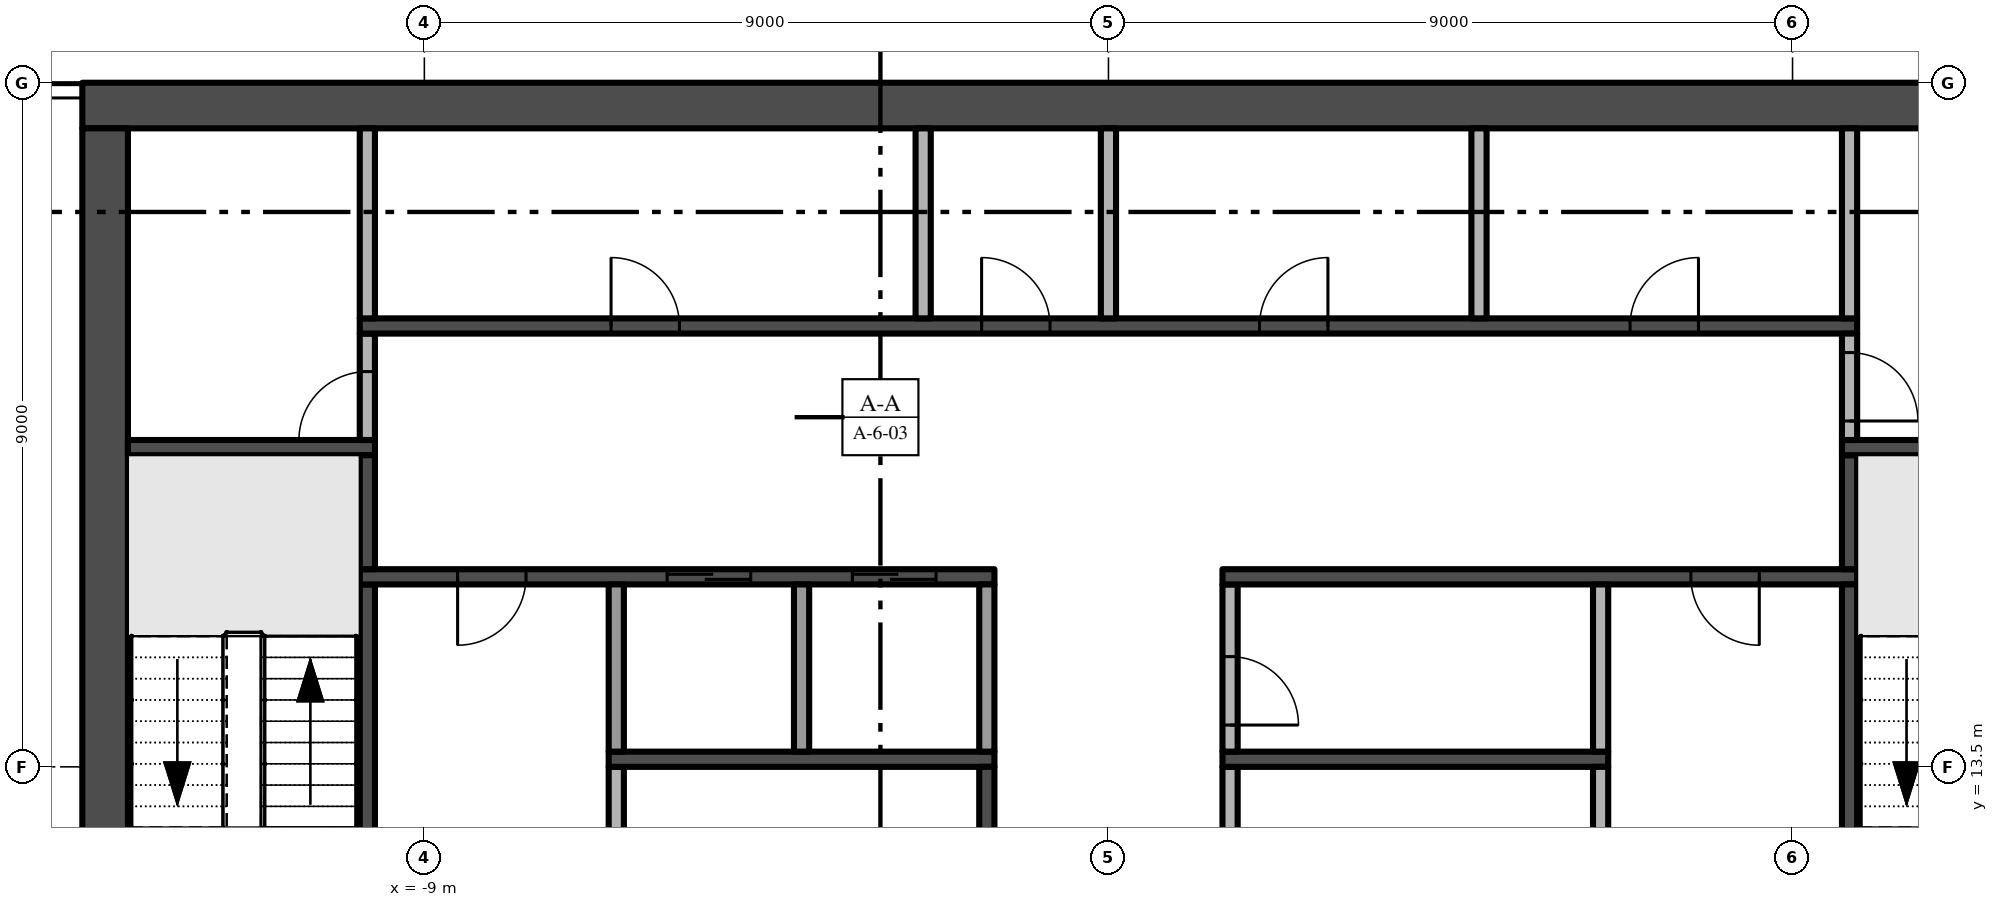
"""IFC4 building model, lengths in metres.
Left out: names, types, materials, properties, quantities, classifications, styles, units other than length and angle.
Written with IfcOpenShell. Run it as: python <this file> out.ifc"""

import sys

from ifc_helpers import new_model, si_unit, direction, frame, frame_2d, origin, place, context, subcontext, project, spatial, rectangle, extrude, element, fill, save


model = new_model("IFC4")
c1 = context("Model", 3, precision=1e-05, world=origin(), true_north=direction((0.0, 1.0)))
c2 = subcontext(c1, "Body", "Model", "MODEL_VIEW")
j1 = project(units=[si_unit("LENGTHUNIT", "METRE"), si_unit("PLANEANGLEUNIT", "RADIAN")], contexts=[c1])
p1 = place(None, origin())
s1 = spatial("IfcSite", under=j1, at=p1, CompositionType="ELEMENT")
p2 = place(p1, origin())
s2 = spatial("IfcBuilding", under=s1, at=p2, CompositionType="ELEMENT")
p3 = place(p2, frame((0.0, 0.0, 297.4)))
s3 = spatial("IfcBuildingStorey", under=s2, at=p3, CompositionType="ELEMENT", Elevation=297.4)
p4 = place(p3, frame((13.5, 22.2, -0.3), z_axis=(0.0, 0.0, 1.0), x_axis=(-1.0, 0.0, 0.0)))
e1 = element("IfcWall", 1, at=p4, inside=s3, PredefinedType="SHEAR", context=c2, shape_type="SweptSolid", body=[
    extrude(rectangle(XDim=27.0, YDim=0.6, at=frame_2d((13.5, 0.0))), origin(), (0.0, 0.0, 1.0), 5.95),
])
p5 = place(p3, frame((-13.2, 21.9, -0.3), z_axis=(0.0, 0.0, 1.0), x_axis=(0.0, -1.0, 0.0)))
e2 = element("IfcWall", 2, at=p5, inside=s3, PredefinedType="SHEAR", context=c2, shape_type="SweptSolid", body=[
    extrude(rectangle(XDim=16.8, YDim=0.6, at=frame_2d((8.4, 0.0))), origin(), (0.0, 0.0, 1.0), 5.95),
])
p6 = place(p5, frame((9.3, 0.0, 0.3)))
e3 = element("IfcOpeningElement", 3, at=p6, cuts=e2, PredefinedType="OPENING", context=c2, shape_type="SweptSolid", body=[
    extrude(rectangle(XDim=1.2, YDim=2.2, at=frame_2d((0.6, 1.1))), frame((0.0, 0.31, 0.0), z_axis=(0.0, -1.0, 0.0), x_axis=(1.0, 0.0, 0.0)), (0.0, 0.0, 1.0), 0.62),
])
p7 = place(p3, frame((-12.9, 17.7, 0.0), z_axis=(0.0, 0.0, 1.0), x_axis=(1.0, 0.0, 0.0)))
e4 = element("IfcWall", 4, at=p7, inside=s3, PredefinedType="SHEAR", context=c2, shape_type="SweptSolid", body=[
    extrude(rectangle(XDim=3.25, YDim=0.2, at=frame_2d((1.625, 0.0))), origin(), (0.0, 0.0, 1.0), 5.65),
])
p8 = place(p3, frame((-9.75, 10.2, 0.0), z_axis=(0.0, 0.0, 1.0), x_axis=(0.0, 1.0, 0.0)))
e5 = element("IfcWall", 5, at=p8, inside=s3, PredefinedType="SHEAR", context=c2, shape_type="SweptSolid", body=[
    extrude(rectangle(XDim=5.7, YDim=0.2, at=frame_2d((2.85, 0.0))), origin(), (0.0, 0.0, 1.0), 5.65),
])
p9 = place(p3, frame((-1.5, 16.0, 0.0), z_axis=(0.0, 0.0, 1.0), x_axis=(-1.0, 0.0, 0.0)))
e6 = element("IfcWall", 6, at=p9, inside=s3, PredefinedType="SHEAR", context=c2, shape_type="SweptSolid", body=[
    extrude(rectangle(XDim=8.35, YDim=0.2, at=frame_2d((4.175, 0.0))), origin(), (0.0, 0.0, 1.0), 5.65),
])
p10 = place(p9, frame((3.206, 0.0, 0.0)))
e7 = element("IfcOpeningElement", 7, at=p10, cuts=e6, PredefinedType="OPENING", context=c2, shape_type="SweptSolid", body=[
    extrude(rectangle(XDim=1.1, YDim=2.1, at=frame_2d((0.55, 1.05))), frame((0.0, 0.11, 0.0), z_axis=(0.0, -1.0, 0.0), x_axis=(1.0, 0.0, 0.0)), (0.0, 0.0, 1.0), 0.22),
])
p11 = place(p9, frame((0.769, 0.0, 0.0)))
e8 = element("IfcOpeningElement", 8, at=p11, cuts=e6, PredefinedType="OPENING", context=c2, shape_type="SweptSolid", body=[
    extrude(rectangle(XDim=1.1, YDim=2.1, at=frame_2d((0.55, 1.05))), frame((0.0, 0.11, 0.0), z_axis=(0.0, -1.0, 0.0), x_axis=(1.0, 0.0, 0.0)), (0.0, 0.0, 1.0), 0.22),
])
p12 = place(p9, frame((6.162, 0.0, 0.0)))
e9 = element("IfcOpeningElement", 9, at=p12, cuts=e6, PredefinedType="OPENING", context=c2, shape_type="SweptSolid", body=[
    extrude(rectangle(XDim=0.9, YDim=2.1, at=frame_2d((0.45, 1.05))), frame((0.0, 0.11, 0.0), z_axis=(0.0, -1.0, 0.0), x_axis=(1.0, 0.0, 0.0)), (0.0, 0.0, 1.0), 0.22),
])
p13 = place(p3, frame((-9.75, 16.1, 0.0), z_axis=(0.0, 0.0, 1.0), x_axis=(0.0, 1.0, 0.0)))
e10 = element("IfcWall", 10, at=p13, inside=s3, PredefinedType="SHEAR", context=c2, shape_type="SweptSolid", body=[
    extrude(rectangle(XDim=1.5, YDim=0.2, at=frame_2d((0.75, 0.0))), origin(), (0.0, 0.0, 1.0), 5.65),
])
p14 = place(p3, frame((-9.75, 17.8, 0.0), z_axis=(0.0, 0.0, 1.0), x_axis=(0.0, 1.0, 0.0)))
e11 = element("IfcWall", 11, at=p14, inside=s3, PredefinedType="PARTITIONING", context=c2, shape_type="SweptSolid", body=[
    extrude(rectangle(XDim=1.4, YDim=0.2, at=frame_2d((0.7, 0.0))), origin(), (0.0, 0.0, 1.0), 5.65),
])
p15 = place(p14, origin())
e12 = element("IfcOpeningElement", 12, at=p15, cuts=e11, PredefinedType="OPENING", context=c2, shape_type="SweptSolid", body=[
    extrude(rectangle(XDim=0.9, YDim=2.1, at=frame_2d((0.45, 1.05))), frame((0.0, 0.11, 0.0), z_axis=(0.0, -1.0, 0.0), x_axis=(1.0, 0.0, 0.0)), (0.0, 0.0, 1.0), 0.22),
])
p16 = place(p3, frame((-9.85, 19.3, 0.0), z_axis=(0.0, 0.0, 1.0), x_axis=(1.0, 0.0, 0.0)))
e13 = element("IfcWall", 13, at=p16, inside=s3, PredefinedType="SHEAR", context=c2, shape_type="SweptSolid", body=[
    extrude(rectangle(XDim=19.7, YDim=0.2, at=frame_2d((9.85, 0.0))), origin(), (0.0, 0.0, 1.0), 5.65),
])
p17 = place(p16, frame((11.838, 0.0, 0.0)))
e14 = element("IfcOpeningElement", 14, at=p17, cuts=e13, PredefinedType="OPENING", context=c2, shape_type="SweptSolid", body=[
    extrude(rectangle(XDim=0.9, YDim=2.1, at=frame_2d((0.45, 1.05))), frame((0.0, 0.11, 0.0), z_axis=(0.0, -1.0, 0.0), x_axis=(1.0, 0.0, 0.0)), (0.0, 0.0, 1.0), 0.22),
])
p18 = place(p16, frame((16.712, 0.0, 0.0)))
e15 = element("IfcOpeningElement", 15, at=p18, cuts=e13, PredefinedType="OPENING", context=c2, shape_type="SweptSolid", body=[
    extrude(rectangle(XDim=0.9, YDim=2.1, at=frame_2d((0.45, 1.05))), frame((0.0, 0.11, 0.0), z_axis=(0.0, -1.0, 0.0), x_axis=(1.0, 0.0, 0.0)), (0.0, 0.0, 1.0), 0.22),
])
p19 = place(p16, frame((3.306, 0.0, 0.0)))
e16 = element("IfcOpeningElement", 16, at=p19, cuts=e13, PredefinedType="OPENING", context=c2, shape_type="SweptSolid", body=[
    extrude(rectangle(XDim=0.9, YDim=2.1, at=frame_2d((0.45, 1.05))), frame((0.0, 0.11, 0.0), z_axis=(0.0, -1.0, 0.0), x_axis=(1.0, 0.0, 0.0)), (0.0, 0.0, 1.0), 0.22),
])
p20 = place(p16, frame((8.181, 0.0, 0.0)))
e17 = element("IfcOpeningElement", 17, at=p20, cuts=e13, PredefinedType="OPENING", context=c2, shape_type="SweptSolid", body=[
    extrude(rectangle(XDim=0.9, YDim=2.1, at=frame_2d((0.45, 1.05))), frame((0.0, 0.11, 0.0), z_axis=(0.0, -1.0, 0.0), x_axis=(1.0, 0.0, 0.0)), (0.0, 0.0, 1.0), 0.22),
])
p21 = place(p3, frame((-9.75, 19.4, 0.0), z_axis=(0.0, 0.0, 1.0), x_axis=(0.0, 1.0, 0.0)))
e18 = element("IfcWall", 18, at=p21, inside=s3, PredefinedType="PARTITIONING", context=c2, shape_type="SweptSolid", body=[
    extrude(rectangle(XDim=2.5, YDim=0.2, at=frame_2d((1.25, 0.0))), origin(), (0.0, 0.0, 1.0), 5.65),
])
p22 = place(p3, frame((-6.475, 8.15, 0.0), z_axis=(0.0, 0.0, 1.0), x_axis=(0.0, 1.0, 0.0)))
e19 = element("IfcWall", 19, at=p22, inside=s3, PredefinedType="PARTITIONING", context=c2, shape_type="SweptSolid", body=[
    extrude(rectangle(XDim=5.35, YDim=0.2, at=frame_2d((2.675, 0.0))), origin(), (0.0, 0.0, 1.0), 5.65),
])
p23 = place(p3, frame((-6.575, 13.6, 0.0), z_axis=(0.0, 0.0, 1.0), x_axis=(1.0, 0.0, 0.0)))
e20 = element("IfcWall", 20, at=p23, inside=s3, PredefinedType="SHEAR", context=c2, shape_type="SweptSolid", body=[
    extrude(rectangle(XDim=5.075, YDim=0.2, at=frame_2d((2.538, 0.0))), origin(), (0.0, 0.0, 1.0), 5.65),
])
for number, where, z_axis, x_axis in (
    (21, (-6.475, 13.7, 0.0), (0.0, 0.0, 1.0), (0.0, 1.0, 0.0)),
    (22, (-4.037, 13.7, 0.0), (0.0, 0.0, 1.0), (0.0, 1.0, 0.0)),
):
    element("IfcWall", number, at=place(p3, frame(where, z_axis=z_axis, x_axis=x_axis)), inside=s3, PredefinedType="PARTITIONING", context=c2, shape_type="SweptSolid", body=[
        extrude(rectangle(XDim=2.2, YDim=0.2, at=frame_2d((1.1, 0.0))), origin(), (0.0, 0.0, 1.0), 5.65),
    ])
p24 = place(p3, frame((-2.438, 19.4, 0.0), z_axis=(0.0, 0.0, 1.0), x_axis=(0.0, 1.0, 0.0)))
e23 = element("IfcWall", 23, at=p24, inside=s3, PredefinedType="PARTITIONING", context=c2, shape_type="SweptSolid", body=[
    extrude(rectangle(XDim=2.5, YDim=0.2, at=frame_2d((1.25, 0.0))), origin(), (0.0, 0.0, 1.0), 5.65),
])
p25 = place(p3, frame((-1.6, 8.15, 0.0), z_axis=(0.0, 0.0, 1.0), x_axis=(0.0, 1.0, 0.0)))
e24 = element("IfcWall", 24, at=p25, inside=s3, PredefinedType="SHEAR", context=c2, shape_type="SweptSolid", body=[
    extrude(rectangle(XDim=5.35, YDim=0.2, at=frame_2d((2.675, 0.0))), origin(), (0.0, 0.0, 1.0), 5.65),
])
p26 = place(p25, frame((2.225, 0.0, 0.0)))
e25 = element("IfcOpeningElement", 25, at=p26, cuts=e24, PredefinedType="OPENING", context=c2, shape_type="SweptSolid", body=[
    extrude(rectangle(XDim=0.9, YDim=2.1, at=frame_2d((0.45, 1.05))), frame((0.0, 0.11, 0.0), z_axis=(0.0, -1.0, 0.0), x_axis=(1.0, 0.0, 0.0)), (0.0, 0.0, 1.0), 0.22),
])
p27 = place(p3, frame((-1.6, 13.7, 0.0), z_axis=(0.0, 0.0, 1.0), x_axis=(0.0, 1.0, 0.0)))
e26 = element("IfcWall", 26, at=p27, inside=s3, PredefinedType="PARTITIONING", context=c2, shape_type="SweptSolid", body=[
    extrude(rectangle(XDim=2.2, YDim=0.2, at=frame_2d((1.1, 0.0))), origin(), (0.0, 0.0, 1.0), 5.65),
])
p28 = place(p3, frame((0.0, 19.4, 0.0), z_axis=(0.0, 0.0, 1.0), x_axis=(0.0, 1.0, 0.0)))
e27 = element("IfcWall", 27, at=p28, inside=s3, PredefinedType="PARTITIONING", context=c2, shape_type="SweptSolid", body=[
    extrude(rectangle(XDim=2.5, YDim=0.2, at=frame_2d((1.25, 0.0))), origin(), (0.0, 0.0, 1.0), 5.65),
])
p29 = place(p3, frame((1.6, 13.5, 0.0), z_axis=(0.0, 0.0, 1.0), x_axis=(0.0, -1.0, 0.0)))
e28 = element("IfcWall", 28, at=p29, inside=s3, PredefinedType="PARTITIONING", context=c2, shape_type="SweptSolid", body=[
    extrude(rectangle(XDim=2.9, YDim=0.2, at=frame_2d((1.45, 0.0))), origin(), (0.0, 0.0, 1.0), 5.65),
])
p30 = place(p29, frame((1.0, 0.0, 0.0)))
e29 = element("IfcOpeningElement", 29, at=p30, cuts=e28, PredefinedType="OPENING", context=c2, shape_type="SweptSolid", body=[
    extrude(rectangle(XDim=0.9, YDim=2.1, at=frame_2d((0.45, 1.05))), frame((0.0, 0.11, 0.0), z_axis=(0.0, -1.0, 0.0), x_axis=(1.0, 0.0, 0.0)), (0.0, 0.0, 1.0), 0.22),
])
p31 = place(p3, frame((1.5, 13.6, 0.0), z_axis=(0.0, 0.0, 1.0), x_axis=(1.0, 0.0, 0.0)))
e30 = element("IfcWall", 30, at=p31, inside=s3, PredefinedType="SHEAR", context=c2, shape_type="SweptSolid", body=[
    extrude(rectangle(XDim=5.075, YDim=0.2, at=frame_2d((2.538, 0.0))), origin(), (0.0, 0.0, 1.0), 5.65),
])
p32 = place(p3, frame((1.6, 15.9, 0.0), z_axis=(0.0, 0.0, 1.0), x_axis=(0.0, -1.0, 0.0)))
e31 = element("IfcWall", 31, at=p32, inside=s3, PredefinedType="PARTITIONING", context=c2, shape_type="SweptSolid", body=[
    extrude(rectangle(XDim=2.2, YDim=0.2, at=frame_2d((1.1, 0.0))), origin(), (0.0, 0.0, 1.0), 5.65),
])
p33 = place(p32, frame((0.95, 0.0, 0.0)))
e32 = element("IfcOpeningElement", 32, at=p33, cuts=e31, PredefinedType="OPENING", context=c2, shape_type="SweptSolid", body=[
    extrude(rectangle(XDim=0.9, YDim=2.1, at=frame_2d((0.45, 1.05))), frame((0.0, 0.11, 0.0), z_axis=(0.0, -1.0, 0.0), x_axis=(1.0, 0.0, 0.0)), (0.0, 0.0, 1.0), 0.22),
])
p34 = place(p3, frame((9.85, 16.0, 0.0), z_axis=(0.0, 0.0, 1.0), x_axis=(-1.0, 0.0, 0.0)))
e33 = element("IfcWall", 33, at=p34, inside=s3, PredefinedType="SHEAR", context=c2, shape_type="SweptSolid", body=[
    extrude(rectangle(XDim=8.35, YDim=0.2, at=frame_2d((4.175, 0.0))), origin(), (0.0, 0.0, 1.0), 5.65),
])
p35 = place(p34, frame((1.288, 0.0, 0.0)))
e34 = element("IfcOpeningElement", 34, at=p35, cuts=e33, PredefinedType="OPENING", context=c2, shape_type="SweptSolid", body=[
    extrude(rectangle(XDim=0.9, YDim=2.1, at=frame_2d((0.45, 1.05))), frame((0.0, 0.11, 0.0), z_axis=(0.0, -1.0, 0.0), x_axis=(1.0, 0.0, 0.0)), (0.0, 0.0, 1.0), 0.22),
])
p36 = place(p3, frame((4.875, 19.4, 0.0), z_axis=(0.0, 0.0, 1.0), x_axis=(0.0, 1.0, 0.0)))
e35 = element("IfcWall", 35, at=p36, inside=s3, PredefinedType="PARTITIONING", context=c2, shape_type="SweptSolid", body=[
    extrude(rectangle(XDim=2.5, YDim=0.2, at=frame_2d((1.25, 0.0))), origin(), (0.0, 0.0, 1.0), 5.65),
])
p37 = place(p3, frame((6.475, 12.3, 0.0), z_axis=(0.0, 0.0, 1.0), x_axis=(0.0, 1.0, 0.0)))
e36 = element("IfcWall", 36, at=p37, inside=s3, PredefinedType="PARTITIONING", context=c2, shape_type="SweptSolid", body=[
    extrude(rectangle(XDim=1.2, YDim=0.2, at=frame_2d((0.6, 0.0))), origin(), (0.0, 0.0, 1.0), 5.65),
])
p38 = place(p3, frame((6.475, 13.7, 0.0), z_axis=(0.0, 0.0, 1.0), x_axis=(0.0, 1.0, 0.0)))
e37 = element("IfcWall", 37, at=p38, inside=s3, PredefinedType="PARTITIONING", context=c2, shape_type="SweptSolid", body=[
    extrude(rectangle(XDim=2.2, YDim=0.2, at=frame_2d((1.1, 0.0))), origin(), (0.0, 0.0, 1.0), 5.65),
])
p39 = place(p3, frame((9.75, 12.3, 0.0), z_axis=(0.0, 0.0, 1.0), x_axis=(0.0, 1.0, 0.0)))
e38 = element("IfcWall", 38, at=p39, inside=s3, PredefinedType="SHEAR", context=c2, shape_type="SweptSolid", body=[
    extrude(rectangle(XDim=3.6, YDim=0.2, at=frame_2d((1.8, 0.0))), origin(), (0.0, 0.0, 1.0), 5.65),
])
p40 = place(p3, frame((9.75, 16.1, 0.0), z_axis=(0.0, 0.0, 1.0), x_axis=(0.0, 1.0, 0.0)))
e39 = element("IfcWall", 39, at=p40, inside=s3, PredefinedType="SHEAR", context=c2, shape_type="SweptSolid", body=[
    extrude(rectangle(XDim=1.5, YDim=0.2, at=frame_2d((0.75, 0.0))), origin(), (0.0, 0.0, 1.0), 5.65),
])
p41 = place(p3, frame((9.65, 17.7, 0.0), z_axis=(0.0, 0.0, 1.0), x_axis=(1.0, 0.0, 0.0)))
e40 = element("IfcWall", 40, at=p41, inside=s3, PredefinedType="SHEAR", context=c2, shape_type="SweptSolid", body=[
    extrude(rectangle(XDim=3.25, YDim=0.2, at=frame_2d((1.625, 0.0))), origin(), (0.0, 0.0, 1.0), 5.65),
])
p42 = place(p3, frame((9.75, 19.2, 0.0), z_axis=(0.0, 0.0, 1.0), x_axis=(0.0, -1.0, 0.0)))
e41 = element("IfcWall", 41, at=p42, inside=s3, PredefinedType="PARTITIONING", context=c2, shape_type="SweptSolid", body=[
    extrude(rectangle(XDim=1.4, YDim=0.2, at=frame_2d((0.7, 0.0))), origin(), (0.0, 0.0, 1.0), 5.65),
])
p43 = place(p42, frame((0.25, 0.0, 0.0)))
e42 = element("IfcOpeningElement", 42, at=p43, cuts=e41, PredefinedType="OPENING", context=c2, shape_type="SweptSolid", body=[
    extrude(rectangle(XDim=0.9, YDim=2.1, at=frame_2d((0.45, 1.05))), frame((0.0, 0.11, 0.0), z_axis=(0.0, -1.0, 0.0), x_axis=(1.0, 0.0, 0.0)), (0.0, 0.0, 1.0), 0.22),
])
p44 = place(p3, frame((9.75, 19.4, 0.0), z_axis=(0.0, 0.0, 1.0), x_axis=(0.0, 1.0, 0.0)))
e43 = element("IfcWall", 43, at=p44, inside=s3, PredefinedType="PARTITIONING", context=c2, shape_type="SweptSolid", body=[
    extrude(rectangle(XDim=2.5, YDim=0.2, at=frame_2d((1.25, 0.0))), origin(), (0.0, 0.0, 1.0), 5.65),
])
p45 = place(p10, origin())
e44 = element("IfcDoor", 44, at=p45, inside=s3, OperationType="SLIDING_TO_LEFT", PredefinedType="DOOR", context=c2, shape_type="SweptSolid", body=[
    extrude(rectangle(XDim=1.1, YDim=2.1, at=frame_2d((0.55, 1.05))), frame((0.0, 0.025, 0.0), z_axis=(0.0, -1.0, 0.0), x_axis=(1.0, 0.0, 0.0)), (0.0, 0.0, 1.0), 0.05),
])
fill(e7, e44)
p46 = place(p11, origin())
e45 = element("IfcDoor", 45, at=p46, inside=s3, OperationType="SLIDING_TO_LEFT", PredefinedType="DOOR", context=c2, shape_type="SweptSolid", body=[
    extrude(rectangle(XDim=1.1, YDim=2.1, at=frame_2d((0.55, 1.05))), frame((0.0, 0.025, 0.0), z_axis=(0.0, -1.0, 0.0), x_axis=(1.0, 0.0, 0.0)), (0.0, 0.0, 1.0), 0.05),
])
fill(e8, e45)
p47 = place(p12, origin())
e46 = element("IfcDoor", 46, at=p47, inside=s3, OperationType="SINGLE_SWING_RIGHT", PredefinedType="DOOR", context=c2, shape_type="SweptSolid", body=[
    extrude(rectangle(XDim=0.9, YDim=2.1, at=frame_2d((0.45, 1.05))), frame((0.0, 0.025, 0.0), z_axis=(0.0, -1.0, 0.0), x_axis=(1.0, 0.0, 0.0)), (0.0, 0.0, 1.0), 0.05),
])
fill(e9, e46)
p48 = place(p35, origin())
e47 = element("IfcDoor", 47, at=p48, inside=s3, OperationType="SINGLE_SWING_LEFT", PredefinedType="DOOR", context=c2, shape_type="SweptSolid", body=[
    extrude(rectangle(XDim=0.9, YDim=2.1, at=frame_2d((0.45, 1.05))), frame((0.0, 0.025, 0.0), z_axis=(0.0, -1.0, 0.0), x_axis=(1.0, 0.0, 0.0)), (0.0, 0.0, 1.0), 0.05),
])
fill(e34, e47)
p49 = place(p15, origin())
e48 = element("IfcDoor", 48, at=p49, inside=s3, OperationType="SINGLE_SWING_LEFT", PredefinedType="DOOR", context=c2, shape_type="SweptSolid", body=[
    extrude(rectangle(XDim=0.9, YDim=2.1, at=frame_2d((0.45, 1.05))), frame((0.0, 0.025, 0.0), z_axis=(0.0, -1.0, 0.0), x_axis=(1.0, 0.0, 0.0)), (0.0, 0.0, 1.0), 0.05),
])
fill(e12, e48)
p50 = place(p43, origin())
e49 = element("IfcDoor", 49, at=p50, inside=s3, OperationType="SINGLE_SWING_RIGHT", PredefinedType="DOOR", context=c2, shape_type="SweptSolid", body=[
    extrude(rectangle(XDim=0.9, YDim=2.1, at=frame_2d((0.45, 1.05))), frame((0.0, 0.025, 0.0), z_axis=(0.0, -1.0, 0.0), x_axis=(1.0, 0.0, 0.0)), (0.0, 0.0, 1.0), 0.05),
])
fill(e42, e49)
p51 = place(p17, origin())
e50 = element("IfcDoor", 50, at=p51, inside=s3, OperationType="SINGLE_SWING_RIGHT", PredefinedType="DOOR", context=c2, shape_type="SweptSolid", body=[
    extrude(rectangle(XDim=0.9, YDim=2.1, at=frame_2d((0.45, 1.05))), frame((0.0, 0.025, 0.0), z_axis=(0.0, -1.0, 0.0), x_axis=(1.0, 0.0, 0.0)), (0.0, 0.0, 1.0), 0.05),
])
fill(e14, e50)
p52 = place(p18, origin())
e51 = element("IfcDoor", 51, at=p52, inside=s3, OperationType="SINGLE_SWING_RIGHT", PredefinedType="DOOR", context=c2, shape_type="SweptSolid", body=[
    extrude(rectangle(XDim=0.9, YDim=2.1, at=frame_2d((0.45, 1.05))), frame((0.0, 0.025, 0.0), z_axis=(0.0, -1.0, 0.0), x_axis=(1.0, 0.0, 0.0)), (0.0, 0.0, 1.0), 0.05),
])
fill(e15, e51)
p53 = place(p33, origin())
e52 = element("IfcDoor", 52, at=p53, inside=s3, OperationType="SINGLE_SWING_RIGHT", PredefinedType="DOOR", context=c2, shape_type="SweptSolid", body=[
    extrude(rectangle(XDim=0.9, YDim=2.1, at=frame_2d((0.45, 1.05))), frame((0.0, 0.025, 0.0), z_axis=(0.0, -1.0, 0.0), x_axis=(1.0, 0.0, 0.0)), (0.0, 0.0, 1.0), 0.05),
])
fill(e32, e52)
p54 = place(p19, origin())
e53 = element("IfcDoor", 53, at=p54, inside=s3, OperationType="SINGLE_SWING_LEFT", PredefinedType="DOOR", context=c2, shape_type="SweptSolid", body=[
    extrude(rectangle(XDim=0.9, YDim=2.1, at=frame_2d((0.45, 1.05))), frame((0.0, 0.025, 0.0), z_axis=(0.0, -1.0, 0.0), x_axis=(1.0, 0.0, 0.0)), (0.0, 0.0, 1.0), 0.05),
])
fill(e16, e53)
p55 = place(p20, origin())
e54 = element("IfcDoor", 54, at=p55, inside=s3, OperationType="SINGLE_SWING_LEFT", PredefinedType="DOOR", context=c2, shape_type="SweptSolid", body=[
    extrude(rectangle(XDim=0.9, YDim=2.1, at=frame_2d((0.45, 1.05))), frame((0.0, 0.025, 0.0), z_axis=(0.0, -1.0, 0.0), x_axis=(1.0, 0.0, 0.0)), (0.0, 0.0, 1.0), 0.05),
])
fill(e17, e54)
save(model, sys.argv[1])
